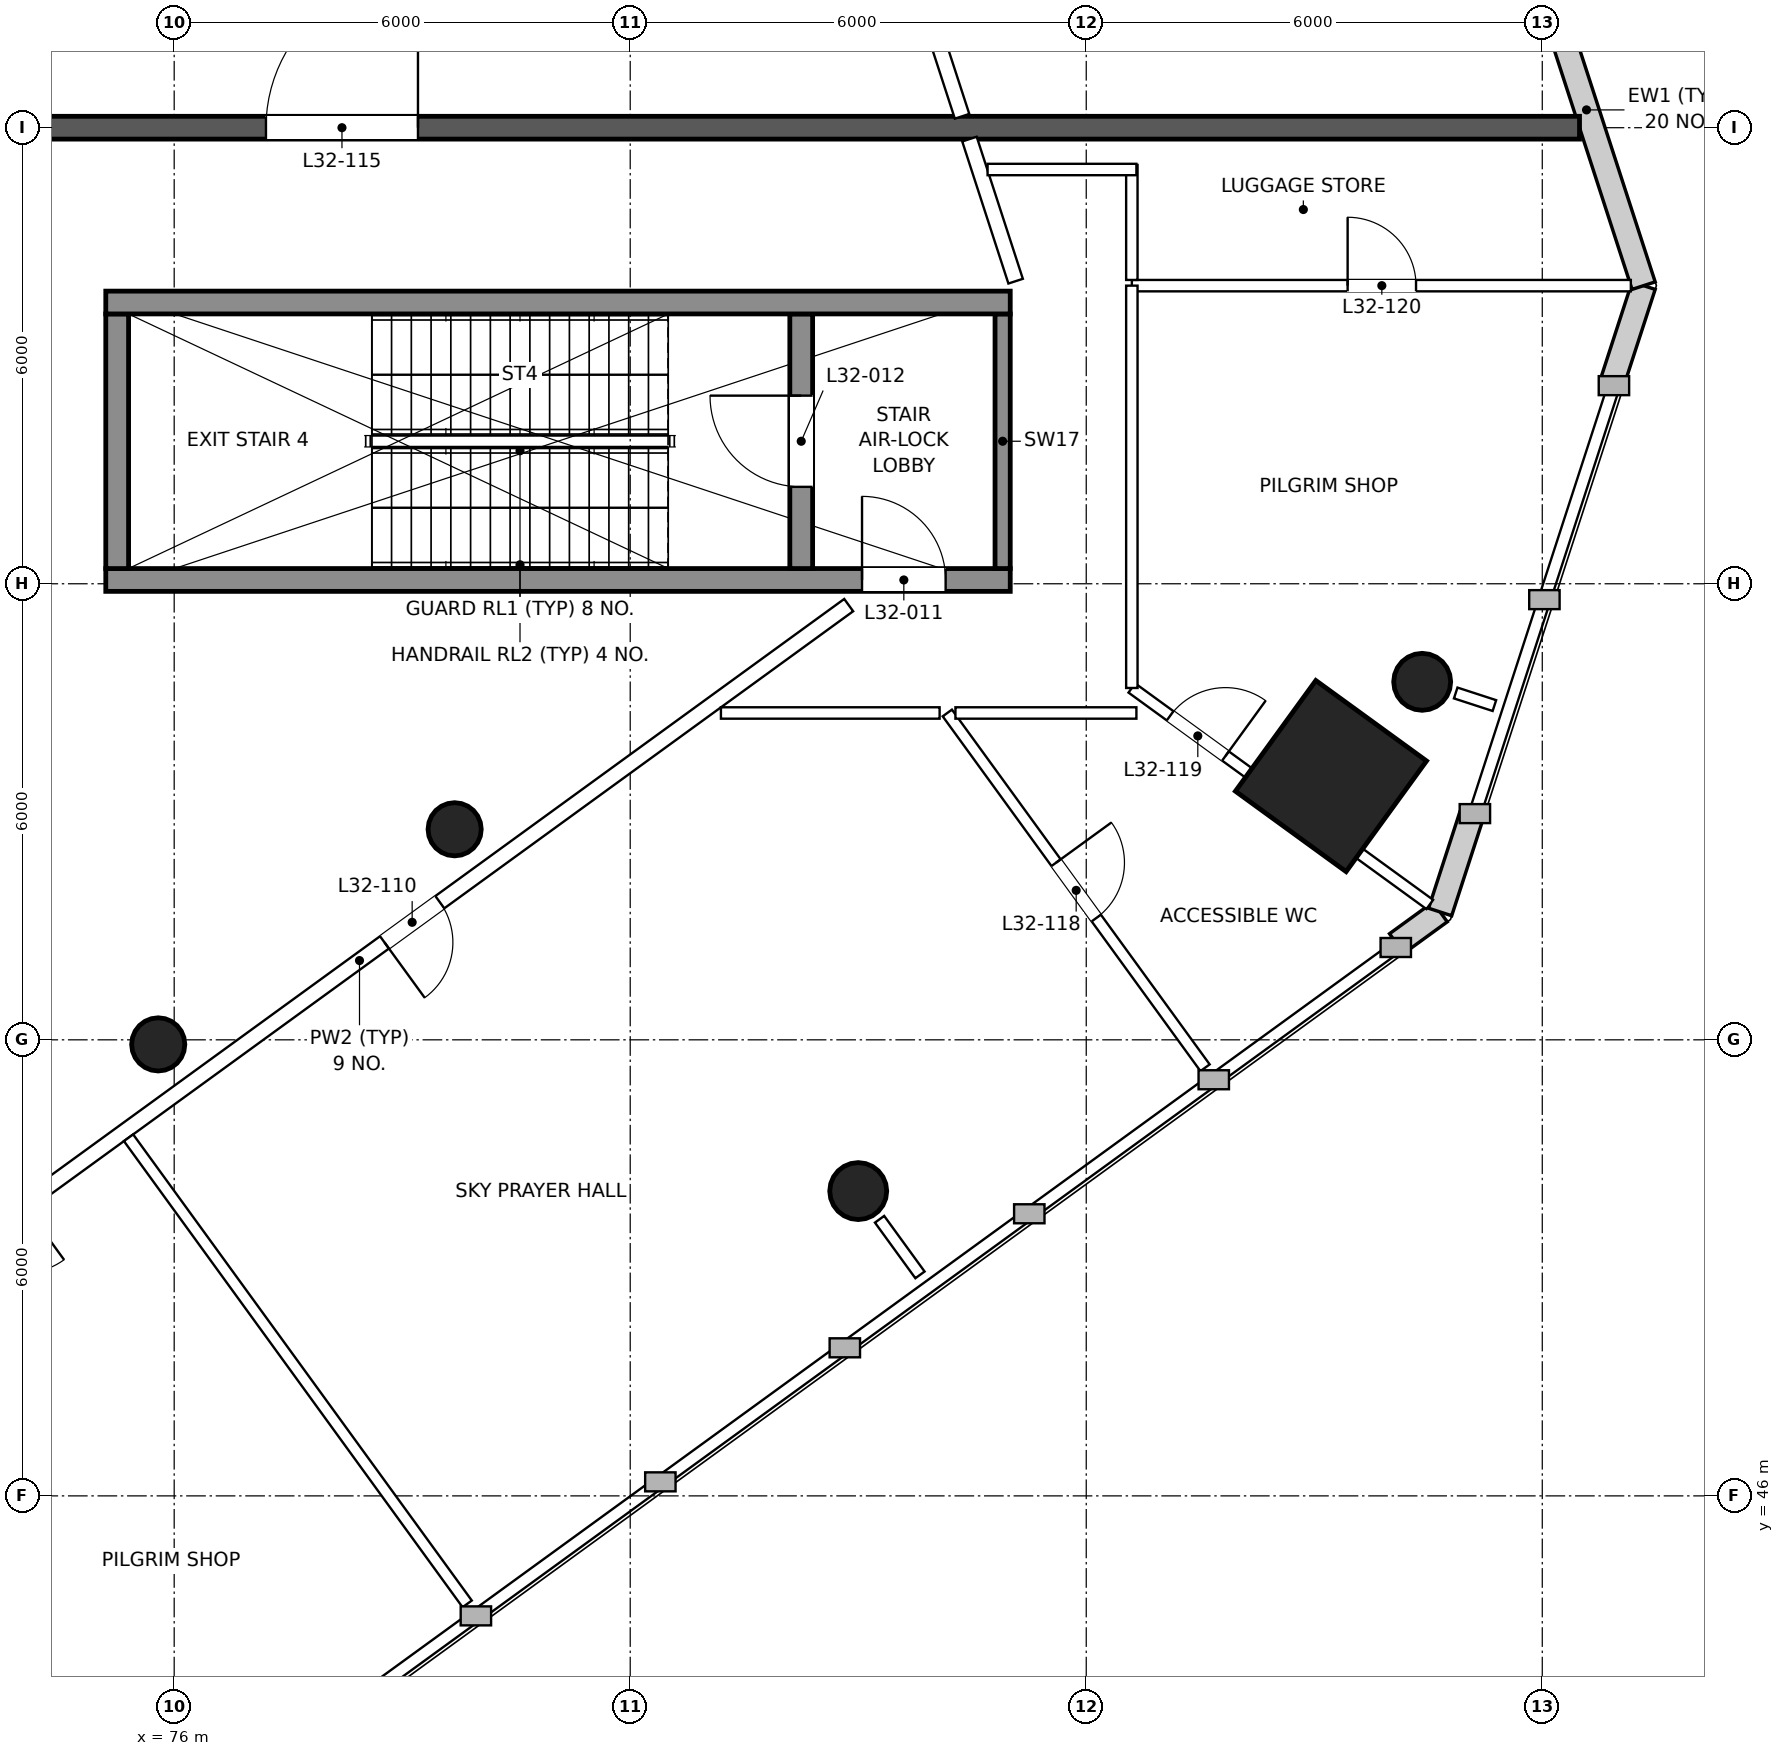
"""IFC4 building model, lengths in metres.
Left out: names, types, materials, properties, quantities, classifications, styles, units other than length and angle.
Written with IfcOpenShell. Run it as: python <this file> out.ifc"""

import sys

from ifc_helpers import new_model, si_unit, direction, frame, frame_2d, origin, origin_2d, place, context, subcontext, project, spatial, rectangle, circle, extrude, element, fill, save


model = new_model("IFC4")
c1 = context("Model", 3, precision=1e-05, world=origin(), true_north=direction((0.0, 1.0)))
c2 = subcontext(c1, "Body", "Model", "MODEL_VIEW")
j1 = project(units=[si_unit("LENGTHUNIT", "METRE"), si_unit("PLANEANGLEUNIT", "RADIAN")], contexts=[c1])
p1 = place(None, origin())
s1 = spatial("IfcSite", under=j1, at=p1, CompositionType="ELEMENT")
p2 = place(p1, origin())
s2 = spatial("IfcBuilding", under=s1, at=p2, CompositionType="ELEMENT")
p3 = place(p2, frame((0.0, 0.0, 142.6)))
s3 = spatial("IfcBuildingStorey", under=s2, at=p3, CompositionType="ELEMENT", Elevation=142.6)
p4 = place(p3, frame((85.0, 50.01, 0.0), z_axis=(0.0, 0.0, 1.0), x_axis=(1.0, 0.0, 0.0)))
e1 = element("IfcColumn", 1, at=p4, inside=s3, PredefinedType="COLUMN", context=c2, shape_type="SweptSolid", body=[
    extrude(circle(Radius=0.375, at=origin_2d()), origin(), (0.0, 0.0, 1.0), 6.0),
])
p5 = place(p3, frame((91.22, 55.47, 0.0), z_axis=(0.0, 0.0, 1.0), x_axis=(0.809016994375, -0.587785252292, 0.0)))
e2 = element("IfcColumn", 2, at=p5, inside=s3, PredefinedType="COLUMN", context=c2, shape_type="SweptSolid", body=[
    extrude(rectangle(XDim=1.8, YDim=1.8, at=origin_2d()), origin(), (0.0, 0.0, 1.0), 6.0),
])
p6 = place(p3, frame((92.42, 56.71, 0.0), z_axis=(0.0, 0.0, 1.0), x_axis=(1.0, 0.0, 0.0)))
e3 = element("IfcColumn", 3, at=p6, inside=s3, PredefinedType="COLUMN", context=c2, shape_type="SweptSolid", body=[
    extrude(circle(Radius=0.375, at=origin_2d()), origin(), (0.0, 0.0, 1.0), 6.0),
])
for number, where, z_axis, x_axis in (
    (4, (75.79, 51.94, 0.0), (0.0, 0.0, 1.0), (1.0, 0.0, 0.0)),
    (5, (79.69, 54.77, 0.0), (0.0, 0.0, 1.0), (1.0, 0.0, 0.0)),
):
    element("IfcColumn", number, at=place(p3, frame(where, z_axis=z_axis, x_axis=x_axis)), inside=s3, PredefinedType="COLUMN", context=c2, shape_type="SweptSolid", body=[
        extrude(circle(Radius=0.35, at=origin_2d()), origin(), (0.0, 0.0, 1.0), 6.0),
    ])
p7 = place(p3, frame((92.084, 53.266, 0.0), z_axis=(0.0, 0.0, 1.0), x_axis=(0.809064470568, 0.587719901369, 0.0)))
e6 = element("IfcWall", 6, at=p7, inside=s3, PredefinedType="SOLIDWALL", context=c2, shape_type="SweptSolid", body=[
    extrude(rectangle(XDim=0.707, YDim=0.32, at=frame_2d((0.354, 0.0))), origin(), (0.0, 0.0, 1.0), 5.7),
])
p8 = place(p3, frame((92.656, 53.682, 0.0), z_axis=(0.0, 0.0, 1.0), x_axis=(0.308961761269, 0.951074460846, 0.0)))
e7 = element("IfcWall", 7, at=p8, inside=s3, PredefinedType="SOLIDWALL", context=c2, shape_type="SweptSolid", body=[
    extrude(rectangle(XDim=1.332, YDim=0.32, at=frame_2d((0.666, 0.0))), origin(), (0.0, 0.0, 1.0), 5.7),
])
p9 = place(p3, frame((94.922, 60.655, 0.0), z_axis=(0.0, 0.0, 1.0), x_axis=(0.309015617768, 0.951056963581, 0.0)))
e8 = element("IfcWall", 8, at=p9, inside=s3, PredefinedType="SOLIDWALL", context=c2, shape_type="SweptSolid", body=[
    extrude(rectangle(XDim=1.332, YDim=0.32, at=frame_2d((0.666, 0.0))), origin(), (0.0, 0.0, 1.0), 5.7),
])
p10 = place(p3, frame((95.333, 61.922, 0.0), z_axis=(0.0, 0.0, 1.0), x_axis=(-0.309003189113, 0.951061001786, 0.0)))
e9 = element("IfcWall", 9, at=p10, inside=s3, PredefinedType="SOLIDWALL", context=c2, shape_type="SweptSolid", body=[
    extrude(rectangle(XDim=4.862, YDim=0.32, at=frame_2d((2.431, 0.0))), origin(), (0.0, 0.0, 1.0), 5.7),
])
p11 = place(p3, frame((75.1, 58.05, 0.0), z_axis=(0.0, 0.0, 1.0), x_axis=(1.0, 0.0, 0.0)))
e10 = element("IfcWall", 10, at=p11, inside=s3, PredefinedType="SHEAR", context=c2, shape_type="SweptSolid", body=[
    extrude(rectangle(XDim=11.9, YDim=0.3, at=frame_2d((5.95, 0.0))), origin(), (0.0, 0.0, 1.0), 6.0),
])
p12 = place(p11, frame((9.95, 0.0, 0.0)))
e11 = element("IfcOpeningElement", 11, at=p12, cuts=e10, PredefinedType="OPENING", context=c2, shape_type="SweptSolid", body=[
    extrude(rectangle(XDim=1.1, YDim=2.1, at=frame_2d((0.55, 1.05))), frame((0.0, 0.16, 0.0), z_axis=(0.0, -1.0, 0.0), x_axis=(1.0, 0.0, 0.0)), (0.0, 0.0, 1.0), 0.32),
])
p13 = place(p3, frame((75.25, 58.2, 0.0), z_axis=(0.0, 0.0, 1.0), x_axis=(0.0, 1.0, 0.0)))
e12 = element("IfcWall", 12, at=p13, inside=s3, PredefinedType="SHEAR", context=c2, shape_type="SweptSolid", body=[
    extrude(rectangle(XDim=3.35, YDim=0.3, at=frame_2d((1.675, 0.0))), origin(), (0.0, 0.0, 1.0), 6.0),
])
p14 = place(p3, frame((84.25, 58.2, 0.0), z_axis=(0.0, 0.0, 1.0), x_axis=(0.0, 1.0, 0.0)))
e13 = element("IfcWall", 13, at=p14, inside=s3, PredefinedType="SHEAR", context=c2, shape_type="SweptSolid", body=[
    extrude(rectangle(XDim=3.35, YDim=0.3, at=frame_2d((1.675, 0.0))), origin(), (0.0, 0.0, 1.0), 6.0),
])
p15 = place(p14, frame((1.075, 0.0, 0.0)))
e14 = element("IfcOpeningElement", 14, at=p15, cuts=e13, PredefinedType="OPENING", context=c2, shape_type="SweptSolid", body=[
    extrude(rectangle(XDim=1.2, YDim=2.1, at=frame_2d((0.6, 1.05))), frame((0.0, 0.16, 0.0), z_axis=(0.0, -1.0, 0.0), x_axis=(1.0, 0.0, 0.0)), (0.0, 0.0, 1.0), 0.32),
])
p16 = place(p3, frame((86.9, 58.2, 0.0), z_axis=(0.0, 0.0, 1.0), x_axis=(0.0, 1.0, 0.0)))
e15 = element("IfcWall", 15, at=p16, inside=s3, PredefinedType="SHEAR", context=c2, shape_type="SweptSolid", body=[
    extrude(rectangle(XDim=3.35, YDim=0.2, at=frame_2d((1.675, 0.0))), origin(), (0.0, 0.0, 1.0), 6.0),
])
p17 = place(p3, frame((75.1, 61.7, 0.0), z_axis=(0.0, 0.0, 1.0), x_axis=(1.0, 0.0, 0.0)))
e16 = element("IfcWall", 16, at=p17, inside=s3, PredefinedType="SHEAR", context=c2, shape_type="SweptSolid", body=[
    extrude(rectangle(XDim=11.9, YDim=0.3, at=frame_2d((5.95, 0.0))), origin(), (0.0, 0.0, 1.0), 6.0),
])
p18 = place(p3, frame((45.51, 64.0, 0.0), z_axis=(0.0, 0.0, 1.0), x_axis=(1.0, 0.0, 0.0)))
e17 = element("IfcWall", 17, at=p18, inside=s3, PredefinedType="PARTITIONING", context=c2, shape_type="SweptSolid", body=[
    extrude(rectangle(XDim=48.98, YDim=0.3, at=frame_2d((24.49, 0.0))), origin(), (0.0, 0.0, 1.0), 5.0),
])
p19 = place(p18, frame((15.283, 0.0, 0.0)))
e18 = element("IfcOpeningElement", 18, at=p19, cuts=e17, PredefinedType="OPENING", context=c2, shape_type="SweptSolid", body=[
    extrude(rectangle(XDim=2.0, YDim=2.1, at=frame_2d((1.0, 1.05))), frame((0.0, 0.16, 0.0), z_axis=(0.0, -1.0, 0.0), x_axis=(1.0, 0.0, 0.0)), (0.0, 0.0, 1.0), 0.32),
])
p20 = place(p18, frame((31.698, 0.0, 0.0)))
e19 = element("IfcOpeningElement", 19, at=p20, cuts=e17, PredefinedType="OPENING", context=c2, shape_type="SweptSolid", body=[
    extrude(rectangle(XDim=2.0, YDim=2.1, at=frame_2d((1.0, 1.05))), frame((0.0, 0.16, 0.0), z_axis=(0.0, -1.0, 0.0), x_axis=(1.0, 0.0, 0.0)), (0.0, 0.0, 1.0), 0.32),
])
p21 = place(p3, frame((83.105, 74.187, 0.0), z_axis=(0.0, 0.0, 1.0), x_axis=(0.309008133723, -0.95105939525, 0.0)))
e20 = element("IfcWall", 20, at=p21, inside=s3, PredefinedType="PARTITIONING", context=c2, shape_type="SweptSolid", body=[
    extrude(rectangle(XDim=10.554, YDim=0.2, at=frame_2d((5.277, 0.0))), origin(), (0.0, 0.0, 1.0), 5.15),
])
p22 = place(p21, frame((5.618, 0.0, 0.0)))
e21 = element("IfcOpeningElement", 21, at=p22, cuts=e20, PredefinedType="OPENING", context=c2, shape_type="SweptSolid", body=[
    extrude(rectangle(XDim=0.9, YDim=2.1, at=frame_2d((0.45, 1.05))), frame((0.0, 0.11, 0.0), z_axis=(0.0, -1.0, 0.0), x_axis=(1.0, 0.0, 0.0)), (0.0, 0.0, 1.0), 0.22),
])
p23 = place(p3, frame((86.464, 63.85, 0.0), z_axis=(0.0, 0.0, 1.0), x_axis=(0.308951238916, -0.951077879026, 0.0)))
e22 = element("IfcWall", 22, at=p23, inside=s3, PredefinedType="PARTITIONING", context=c2, shape_type="SweptSolid", body=[
    extrude(rectangle(XDim=1.965, YDim=0.2, at=frame_2d((0.983, 0.0))), origin(), (0.0, 0.0, 1.0), 5.0),
])
p24 = place(p3, frame((84.875, 57.719, 0.0), z_axis=(0.0, 0.0, 1.0), x_axis=(-0.80902196565, -0.587778409858, 0.0)))
e23 = element("IfcWall", 23, at=p24, inside=s3, PredefinedType="PARTITIONING", context=c2, shape_type="SweptSolid", body=[
    extrude(rectangle(XDim=15.911, YDim=0.2, at=frame_2d((7.956, 0.0))), origin(), (0.0, 0.0, 1.0), 5.25),
])
p25 = place(p24, frame((13.414, 0.0, 0.0)))
e24 = element("IfcOpeningElement", 24, at=p25, cuts=e23, PredefinedType="OPENING", context=c2, shape_type="SweptSolid", body=[
    extrude(rectangle(XDim=0.9, YDim=2.1, at=frame_2d((0.45, 1.05))), frame((0.0, 0.11, 0.0), z_axis=(0.0, -1.0, 0.0), x_axis=(1.0, 0.0, 0.0)), (0.0, 0.0, 1.0), 0.22),
])
p26 = place(p24, frame((6.649, 0.0, 0.0)))
e25 = element("IfcOpeningElement", 25, at=p26, cuts=e23, PredefinedType="OPENING", context=c2, shape_type="SweptSolid", body=[
    extrude(rectangle(XDim=0.9, YDim=2.1, at=frame_2d((0.45, 1.05))), frame((0.0, 0.11, 0.0), z_axis=(0.0, -1.0, 0.0), x_axis=(1.0, 0.0, 0.0)), (0.0, 0.0, 1.0), 0.22),
])
p27 = place(p3, frame((74.471, 40.667, 0.0), z_axis=(0.0, 0.0, 1.0), x_axis=(-0.309004544659, 0.951060561363, 0.0)))
e26 = element("IfcWall", 26, at=p27, inside=s3, PredefinedType="PARTITIONING", context=c2, shape_type="SweptSolid", body=[
    extrude(rectangle(XDim=7.99, YDim=0.15, at=frame_2d((3.995, 0.0))), origin(), (0.0, 0.0, 1.0), 5.7),
])
p28 = place(p3, frame((92.52, 53.781, 0.0), z_axis=(0.0, 0.0, 1.0), x_axis=(-0.809025783817, 0.587773154473, 0.0)))
e27 = element("IfcWall", 27, at=p28, inside=s3, PredefinedType="PARTITIONING", context=c2, shape_type="SweptSolid", body=[
    extrude(rectangle(XDim=4.845, YDim=0.15, at=frame_2d((2.423, 0.0))), origin(), (0.0, 0.0, 1.0), 5.7),
])
p29 = place(p28, frame((3.323, 0.0, 0.0)))
e28 = element("IfcOpeningElement", 28, at=p29, cuts=e27, PredefinedType="OPENING", context=c2, shape_type="SweptSolid", body=[
    extrude(rectangle(XDim=0.9, YDim=2.1, at=frame_2d((0.45, 1.05))), frame((0.0, 0.085, 0.0), z_axis=(0.0, -1.0, 0.0), x_axis=(1.0, 0.0, 0.0)), (0.0, 0.0, 1.0), 0.17),
])
p30 = place(p3, frame((95.165, 61.922, 0.0), z_axis=(0.0, 0.0, 1.0), x_axis=(-1.0, 0.0, 0.0)))
e29 = element("IfcWall", 29, at=p30, inside=s3, PredefinedType="PARTITIONING", context=c2, shape_type="SweptSolid", body=[
    extrude(rectangle(XDim=6.565, YDim=0.15, at=frame_2d((3.283, 0.0))), origin(), (0.0, 0.0, 1.0), 5.7),
])
p31 = place(p30, frame((2.826, 0.0, 0.0)))
e30 = element("IfcOpeningElement", 30, at=p31, cuts=e29, PredefinedType="OPENING", context=c2, shape_type="SweptSolid", body=[
    extrude(rectangle(XDim=0.9, YDim=2.1, at=frame_2d((0.45, 1.05))), frame((0.0, 0.085, 0.0), z_axis=(0.0, -1.0, 0.0), x_axis=(1.0, 0.0, 0.0)), (0.0, 0.0, 1.0), 0.17),
])
p32 = place(p3, frame((79.855, 44.579, 0.0), z_axis=(0.0, 0.0, 1.0), x_axis=(-0.587800109381, 0.80900619986, 0.0)))
e31 = element("IfcWall", 31, at=p32, inside=s3, PredefinedType="PARTITIONING", context=c2, shape_type="SweptSolid", body=[
    extrude(rectangle(XDim=7.58, YDim=0.15, at=frame_2d((3.79, 0.0))), origin(), (0.0, 0.0, 1.0), 5.7),
])
p33 = place(p3, frame((89.563, 51.633, 0.0), z_axis=(0.0, 0.0, 1.0), x_axis=(-0.58778414302, 0.809017800307, 0.0)))
e32 = element("IfcWall", 32, at=p33, inside=s3, PredefinedType="PARTITIONING", context=c2, shape_type="SweptSolid", body=[
    extrude(rectangle(XDim=5.769, YDim=0.15, at=frame_2d((2.885, 0.0))), origin(), (0.0, 0.0, 1.0), 5.25),
])
p34 = place(p33, frame((2.435, 0.0, 0.0)))
e33 = element("IfcOpeningElement", 33, at=p34, cuts=e32, PredefinedType="OPENING", context=c2, shape_type="SweptSolid", body=[
    extrude(rectangle(XDim=0.9, YDim=2.1, at=frame_2d((0.45, 1.05))), frame((0.0, 0.085, 0.0), z_axis=(0.0, -1.0, 0.0), x_axis=(1.0, 0.0, 0.0)), (0.0, 0.0, 1.0), 0.17),
])
p35 = place(p3, frame((85.281, 49.639, 0.0), z_axis=(0.0, 0.0, 1.0), x_axis=(0.587882774267, -0.808946131532, 0.0)))
e34 = element("IfcWall", 34, at=p35, inside=s3, PredefinedType="PARTITIONING", context=c2, shape_type="SweptSolid", body=[
    extrude(rectangle(XDim=0.905, YDim=0.15, at=frame_2d((0.452, 0.0))), origin(), (0.0, 0.0, 1.0), 5.7),
])
p36 = place(p3, frame((92.861, 56.563, 0.0), z_axis=(0.0, 0.0, 1.0), x_axis=(0.950983778631, -0.309240768303, 0.0)))
e35 = element("IfcWall", 35, at=p36, inside=s3, PredefinedType="PARTITIONING", context=c2, shape_type="SweptSolid", body=[
    extrude(rectangle(XDim=0.535, YDim=0.15, at=frame_2d((0.268, 0.0))), origin(), (0.0, 0.0, 1.0), 5.7),
])
p37 = place(p3, frame((88.6, 61.997, 0.0), z_axis=(0.0, 0.0, 1.0), x_axis=(0.0, 1.0, 0.0)))
e36 = element("IfcWall", 36, at=p37, inside=s3, PredefinedType="PARTITIONING", context=c2, shape_type="SweptSolid", body=[
    extrude(rectangle(XDim=1.513, YDim=0.15, at=frame_2d((0.756, 0.0))), origin(), (0.0, 0.0, 1.0), 5.7),
])
p38 = place(p3, frame((88.66, 63.45, 0.0), z_axis=(0.0, 0.0, 1.0), x_axis=(-1.0, 0.0, 0.0)))
e37 = element("IfcWall", 37, at=p38, inside=s3, PredefinedType="PARTITIONING", context=c2, shape_type="SweptSolid", body=[
    extrude(rectangle(XDim=1.958, YDim=0.15, at=frame_2d((0.979, 0.0))), origin(), (0.0, 0.0, 1.0), 5.0),
])
p39 = place(p3, frame((88.6, 56.629, 0.0), z_axis=(0.0, 0.0, 1.0), x_axis=(0.0, 1.0, 0.0)))
e38 = element("IfcWall", 38, at=p39, inside=s3, PredefinedType="PARTITIONING", context=c2, shape_type="SweptSolid", body=[
    extrude(rectangle(XDim=5.293, YDim=0.15, at=frame_2d((2.646, 0.0))), origin(), (0.0, 0.0, 1.0), 5.25),
])
p40 = place(p3, frame((86.279, 56.3, 0.0), z_axis=(0.0, 0.0, 1.0), x_axis=(1.0, 0.0, 0.0)))
e39 = element("IfcWall", 39, at=p40, inside=s3, PredefinedType="PARTITIONING", context=c2, shape_type="SweptSolid", body=[
    extrude(rectangle(XDim=2.381, YDim=0.15, at=frame_2d((1.19, 0.0))), origin(), (0.0, 0.0, 1.0), 5.7),
])
p41 = place(p3, frame((83.194, 56.3, 0.0), z_axis=(0.0, 0.0, 1.0), x_axis=(1.0, 0.0, 0.0)))
e40 = element("IfcWall", 40, at=p41, inside=s3, PredefinedType="PARTITIONING", context=c2, shape_type="SweptSolid", body=[
    extrude(rectangle(XDim=2.877, YDim=0.15, at=frame_2d((1.438, 0.0))), origin(), (0.0, 0.0, 1.0), 5.25),
])
p42 = place(p12, origin())
e41 = element("IfcDoor", 41, at=p42, inside=s3, OperationType="SINGLE_SWING_LEFT", PredefinedType="DOOR", context=c2, shape_type="SweptSolid", body=[
    extrude(rectangle(XDim=1.1, YDim=2.1, at=frame_2d((0.55, 1.05))), frame((0.0, 0.025, 0.0), z_axis=(0.0, -1.0, 0.0), x_axis=(1.0, 0.0, 0.0)), (0.0, 0.0, 1.0), 0.05),
])
fill(e11, e41)
p43 = place(p15, origin())
e42 = element("IfcDoor", 42, at=p43, inside=s3, OperationType="SINGLE_SWING_RIGHT", PredefinedType="DOOR", context=c2, shape_type="SweptSolid", body=[
    extrude(rectangle(XDim=1.2, YDim=2.1, at=frame_2d((0.6, 1.05))), frame((0.0, 0.025, 0.0), z_axis=(0.0, -1.0, 0.0), x_axis=(1.0, 0.0, 0.0)), (0.0, 0.0, 1.0), 0.05),
])
fill(e14, e42)
p44 = place(p26, origin())
e43 = element("IfcDoor", 43, at=p44, inside=s3, OperationType="SINGLE_SWING_RIGHT", PredefinedType="DOOR", context=c2, shape_type="SweptSolid", body=[
    extrude(rectangle(XDim=0.9, YDim=2.1, at=frame_2d((0.45, 1.05))), frame((0.0, 0.025, 0.0), z_axis=(0.0, -1.0, 0.0), x_axis=(1.0, 0.0, 0.0)), (0.0, 0.0, 1.0), 0.05),
])
fill(e25, e43)
p45 = place(p20, origin())
e44 = element("IfcDoor", 44, at=p45, inside=s3, OperationType="DOUBLE_DOOR_SINGLE_SWING", PredefinedType="DOOR", context=c2, shape_type="SweptSolid", body=[
    extrude(rectangle(XDim=2.0, YDim=2.1, at=frame_2d((1.0, 1.05))), frame((0.0, 0.025, 0.0), z_axis=(0.0, -1.0, 0.0), x_axis=(1.0, 0.0, 0.0)), (0.0, 0.0, 1.0), 0.05),
])
fill(e19, e44)
p46 = place(p34, frame((0.9, 0.0, 0.0), z_axis=(0.0, 0.0, 1.0), x_axis=(-1.0, 0.0, 0.0)))
e45 = element("IfcDoor", 45, at=p46, inside=s3, OperationType="SINGLE_SWING_LEFT", PredefinedType="DOOR", context=c2, shape_type="SweptSolid", body=[
    extrude(rectangle(XDim=0.9, YDim=2.1, at=frame_2d((0.45, 1.05))), frame((0.0, 0.025, 0.0), z_axis=(0.0, -1.0, 0.0), x_axis=(1.0, 0.0, 0.0)), (0.0, 0.0, 1.0), 0.05),
])
fill(e33, e45)
p47 = place(p29, frame((0.9, 0.0, 0.0), z_axis=(0.0, 0.0, 1.0), x_axis=(-1.0, 0.0, 0.0)))
e46 = element("IfcDoor", 46, at=p47, inside=s3, OperationType="SINGLE_SWING_RIGHT", PredefinedType="DOOR", context=c2, shape_type="SweptSolid", body=[
    extrude(rectangle(XDim=0.9, YDim=2.1, at=frame_2d((0.45, 1.05))), frame((0.0, 0.025, 0.0), z_axis=(0.0, -1.0, 0.0), x_axis=(1.0, 0.0, 0.0)), (0.0, 0.0, 1.0), 0.05),
])
fill(e28, e46)
p48 = place(p31, frame((0.9, 0.0, 0.0), z_axis=(0.0, 0.0, 1.0), x_axis=(-1.0, 0.0, 0.0)))
e47 = element("IfcDoor", 47, at=p48, inside=s3, OperationType="SINGLE_SWING_LEFT", PredefinedType="DOOR", context=c2, shape_type="SweptSolid", body=[
    extrude(rectangle(XDim=0.9, YDim=2.1, at=frame_2d((0.45, 1.05))), frame((0.0, 0.025, 0.0), z_axis=(0.0, -1.0, 0.0), x_axis=(1.0, 0.0, 0.0)), (0.0, 0.0, 1.0), 0.05),
])
fill(e30, e47)
save(model, sys.argv[1])
